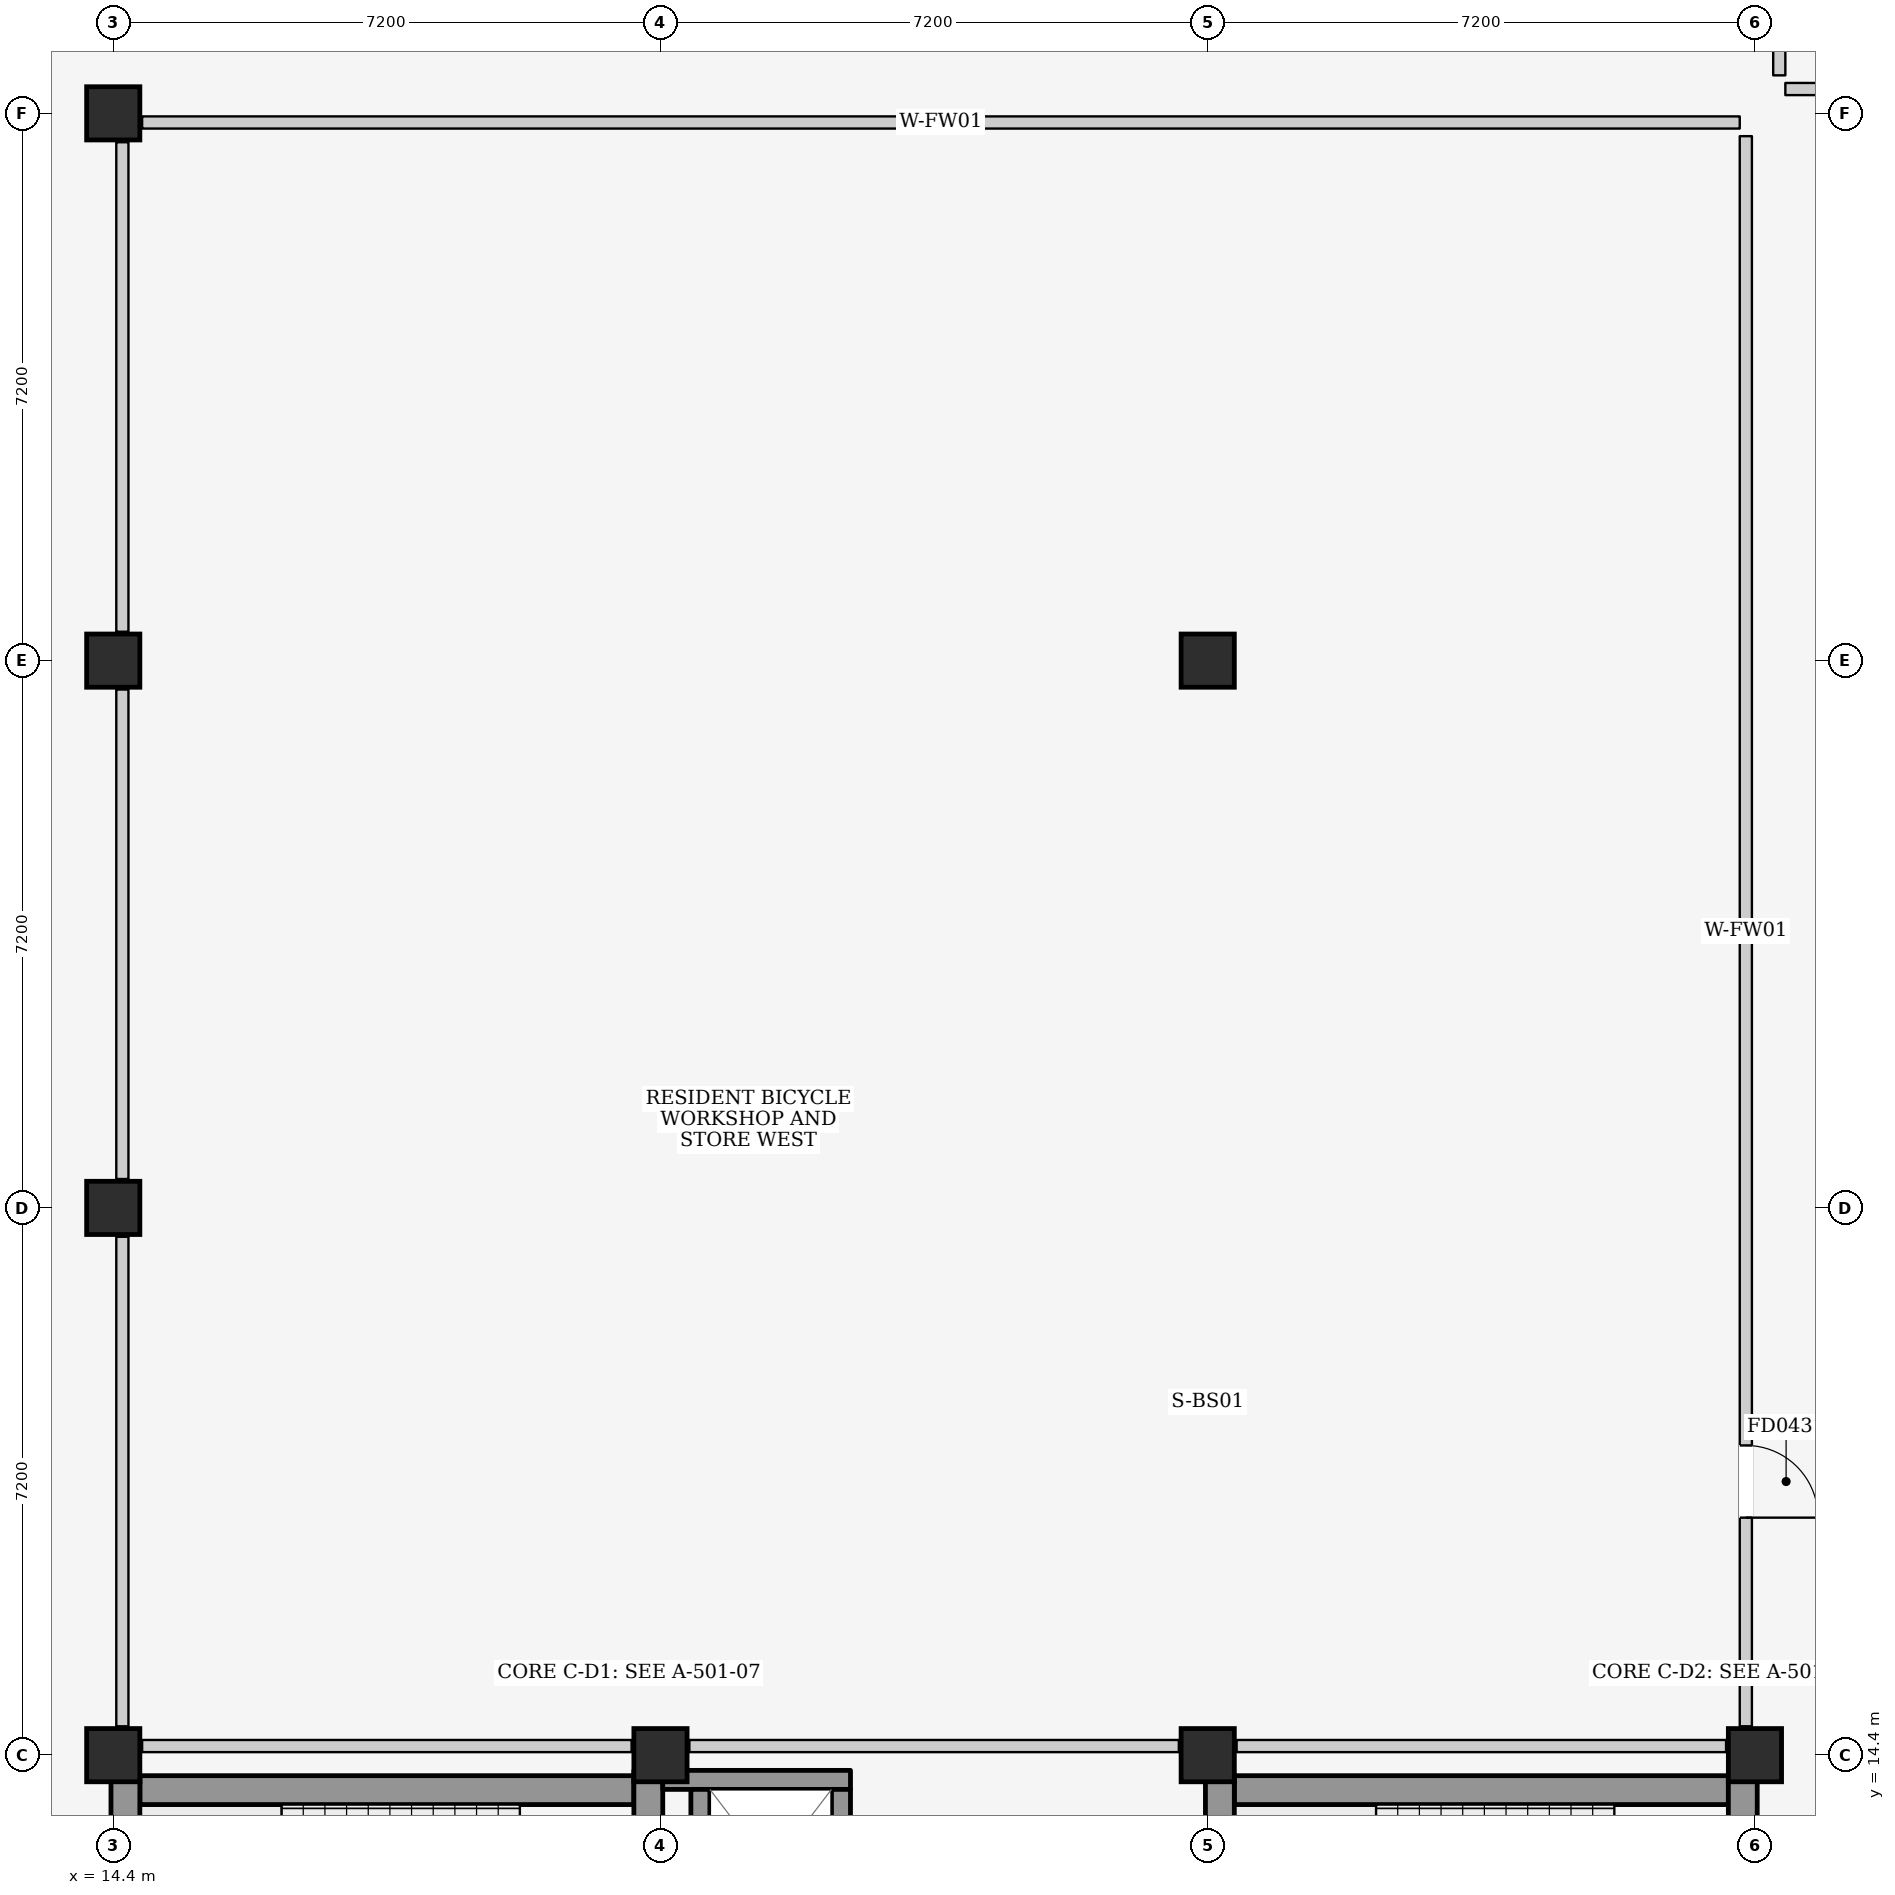
"""IFC4 building model, lengths in metres.
Left out: names, types, materials, properties, quantities, classifications, styles, units other than length and angle.
Written with IfcOpenShell. Run it as: python <this file> out.ifc"""

import sys

from ifc_helpers import new_model, si_unit, direction, frame, frame_2d, origin, origin_2d, place, context, subcontext, project, spatial, rectangle, extrude, element, fill, save


model = new_model("IFC4")
c1 = context("Model", 3, precision=1e-05, world=origin(), true_north=direction((0.0, 1.0)))
c2 = subcontext(c1, "Body", "Model", "MODEL_VIEW")
j1 = project(units=[si_unit("LENGTHUNIT", "METRE"), si_unit("PLANEANGLEUNIT", "RADIAN")], contexts=[c1])
p1 = place(None, origin())
s1 = spatial("IfcSite", under=j1, at=p1, CompositionType="ELEMENT")
p2 = place(p1, origin())
s2 = spatial("IfcBuilding", under=s1, at=p2, CompositionType="ELEMENT")
p3 = place(p2, frame((0.0, 0.0, -4.2)))
s3 = spatial("IfcBuildingStorey", under=s2, at=p3, CompositionType="ELEMENT", Elevation=-4.2)
for number, where, z_axis, x_axis in (
    (1, (14.4, 14.4, 0.0), (0.0, 0.0, 1.0), (1.0, 0.0, 0.0)),
    (2, (14.4, 21.6, 0.0), (0.0, 0.0, 1.0), (1.0, 0.0, 0.0)),
    (3, (14.4, 28.8, 0.0), (0.0, 0.0, 1.0), (1.0, 0.0, 0.0)),
    (4, (14.4, 36.0, 0.0), (0.0, 0.0, 1.0), (1.0, 0.0, 0.0)),
    (5, (21.6, 14.4, 0.0), (0.0, 0.0, 1.0), (1.0, 0.0, 0.0)),
    (6, (28.8, 14.4, 0.0), (0.0, 0.0, 1.0), (1.0, 0.0, 0.0)),
):
    element("IfcColumn", number, at=place(p3, frame(where, z_axis=z_axis, x_axis=x_axis)), inside=s3, PredefinedType="COLUMN", context=c2, shape_type="SweptSolid", body=[
        extrude(rectangle(XDim=0.7, YDim=0.7, at=origin_2d()), origin(), (0.0, 0.0, 1.0), 4.2),
    ])
p4 = place(p3, frame((28.8, 28.8, 0.0), z_axis=(0.0, 0.0, 1.0), x_axis=(1.0, 0.0, 0.0)))
e7 = element("IfcColumn", 7, at=p4, inside=s3, PredefinedType="COLUMN", context=c2, shape_type="SweptSolid", body=[
    extrude(rectangle(XDim=0.7, YDim=0.7, at=origin_2d()), origin(), (0.0, 0.0, 1.0), 3.98),
])
p5 = place(p3, frame((36.0, 14.4, 0.0), z_axis=(0.0, 0.0, 1.0), x_axis=(1.0, 0.0, 0.0)))
e8 = element("IfcColumn", 8, at=p5, inside=s3, PredefinedType="COLUMN", context=c2, shape_type="SweptSolid", body=[
    extrude(rectangle(XDim=0.7, YDim=0.7, at=origin_2d()), origin(), (0.0, 0.0, 1.0), 4.2),
])
p6 = place(p3, frame((14.75, 13.94, 0.0), z_axis=(0.0, 0.0, 1.0), x_axis=(1.0, 0.0, 0.0)))
e9 = element("IfcWall", 9, at=p6, inside=s3, PredefinedType="SHEAR", context=c2, shape_type="SweptSolid", body=[
    extrude(rectangle(XDim=6.5, YDim=0.38, at=frame_2d((3.25, 0.0))), origin(), (0.0, 0.0, 1.0), 3.79),
])
p7 = place(p3, frame((14.56, 10.37, 0.0), z_axis=(0.0, 0.0, 1.0), x_axis=(0.0, 1.0, 0.0)))
e10 = element("IfcWall", 10, at=p7, inside=s3, PredefinedType="SHEAR", context=c2, shape_type="SweptSolid", body=[
    extrude(rectangle(XDim=3.76, YDim=0.38, at=frame_2d((1.88, 0.0))), origin(), (0.0, 0.0, 1.0), 3.79),
])
p8 = place(p3, frame((21.44, 10.37, 0.0), z_axis=(0.0, 0.0, 1.0), x_axis=(0.0, 1.0, 0.0)))
e11 = element("IfcWall", 11, at=p8, inside=s3, PredefinedType="SHEAR", context=c2, shape_type="SweptSolid", body=[
    extrude(rectangle(XDim=3.83, YDim=0.38, at=frame_2d((1.915, 0.0))), origin(), (0.0, 0.0, 1.0), 3.79),
])
p9 = place(p3, frame((21.63, 14.075, 0.0), z_axis=(0.0, 0.0, 1.0), x_axis=(1.0, 0.0, 0.0)))
e12 = element("IfcWall", 12, at=p9, inside=s3, PredefinedType="SHEAR", context=c2, shape_type="SweptSolid", body=[
    extrude(rectangle(XDim=2.47, YDim=0.25, at=frame_2d((1.235, 0.0))), origin(), (0.0, 0.0, 1.0), 3.79),
])
for number, where, z_axis, x_axis in (
    (13, (22.125, 11.85, 0.0), (0.0, 0.0, 1.0), (0.0, 1.0, 0.0)),
    (14, (23.975, 11.85, 0.0), (0.0, 0.0, 1.0), (0.0, 1.0, 0.0)),
):
    element("IfcWall", number, at=place(p3, frame(where, z_axis=z_axis, x_axis=x_axis)), inside=s3, PredefinedType="SHEAR", context=c2, shape_type="SweptSolid", body=[
        extrude(rectangle(XDim=2.1, YDim=0.25, at=frame_2d((1.05, 0.0))), origin(), (0.0, 0.0, 1.0), 3.79),
    ])
p10 = place(p3, frame((29.15, 13.94, 0.0), z_axis=(0.0, 0.0, 1.0), x_axis=(1.0, 0.0, 0.0)))
e15 = element("IfcWall", 15, at=p10, inside=s3, PredefinedType="SHEAR", context=c2, shape_type="SweptSolid", body=[
    extrude(rectangle(XDim=6.5, YDim=0.38, at=frame_2d((3.25, 0.0))), origin(), (0.0, 0.0, 1.0), 3.79),
])
for number, where, z_axis, x_axis in (
    (16, (28.96, 10.37, 0.0), (0.0, 0.0, 1.0), (0.0, 1.0, 0.0)),
    (17, (35.84, 10.37, 0.0), (0.0, 0.0, 1.0), (0.0, 1.0, 0.0)),
):
    element("IfcWall", number, at=place(p3, frame(where, z_axis=z_axis, x_axis=x_axis)), inside=s3, PredefinedType="SHEAR", context=c2, shape_type="SweptSolid", body=[
        extrude(rectangle(XDim=3.76, YDim=0.38, at=frame_2d((1.88, 0.0))), origin(), (0.0, 0.0, 1.0), 3.79),
    ])
p11 = place(p3, frame((14.78, 35.88, 0.0), z_axis=(0.0, 0.0, 1.0), x_axis=(1.0, 0.0, 0.0)))
e18 = element("IfcWall", 18, at=p11, inside=s3, PredefinedType="PARTITIONING", context=c2, shape_type="SweptSolid", body=[
    extrude(rectangle(XDim=21.02, YDim=0.16, at=frame_2d((10.51, 0.0))), origin(), (0.0, 0.0, 1.0), 3.79),
])
for number, where, z_axis, x_axis in (
    (19, (14.78, 14.52, 0.0), (0.0, 0.0, 1.0), (1.0, 0.0, 0.0)),
    (20, (21.98, 14.52, 0.0), (0.0, 0.0, 1.0), (1.0, 0.0, 0.0)),
):
    element("IfcWall", number, at=place(p3, frame(where, z_axis=z_axis, x_axis=x_axis)), inside=s3, PredefinedType="PARTITIONING", context=c2, shape_type="SweptSolid", body=[
        extrude(rectangle(XDim=6.44, YDim=0.16, at=frame_2d((3.22, 0.0))), origin(), (0.0, 0.0, 1.0), 3.025),
    ])
p12 = place(p3, frame((29.18, 14.52, 0.0), z_axis=(0.0, 0.0, 1.0), x_axis=(1.0, 0.0, 0.0)))
e21 = element("IfcWall", 21, at=p12, inside=s3, PredefinedType="PARTITIONING", context=c2, shape_type="SweptSolid", body=[
    extrude(rectangle(XDim=6.44, YDim=0.16, at=frame_2d((3.22, 0.0))), origin(), (0.0, 0.0, 1.0), 3.025),
])
for number, where, z_axis, x_axis in (
    (22, (14.52, 14.78, 0.0), (0.0, 0.0, 1.0), (0.0, 1.0, 0.0)),
    (23, (14.52, 21.98, 0.0), (0.0, 0.0, 1.0), (0.0, 1.0, 0.0)),
):
    element("IfcWall", number, at=place(p3, frame(where, z_axis=z_axis, x_axis=x_axis)), inside=s3, PredefinedType="PARTITIONING", context=c2, shape_type="SweptSolid", body=[
        extrude(rectangle(XDim=6.44, YDim=0.16, at=frame_2d((3.22, 0.0))), origin(), (0.0, 0.0, 1.0), 3.025),
    ])
p13 = place(p3, frame((14.52, 29.18, 0.0), z_axis=(0.0, 0.0, 1.0), x_axis=(0.0, 1.0, 0.0)))
e24 = element("IfcWall", 24, at=p13, inside=s3, PredefinedType="PARTITIONING", context=c2, shape_type="SweptSolid", body=[
    extrude(rectangle(XDim=6.44, YDim=0.16, at=frame_2d((3.22, 0.0))), origin(), (0.0, 0.0, 1.0), 3.025),
])
p14 = place(p3, frame((35.88, 14.78, 0.0), z_axis=(0.0, 0.0, 1.0), x_axis=(0.0, 1.0, 0.0)))
e25 = element("IfcWall", 25, at=p14, inside=s3, PredefinedType="PARTITIONING", context=c2, shape_type="SweptSolid", body=[
    extrude(rectangle(XDim=20.92, YDim=0.16, at=frame_2d((10.46, 0.0))), origin(), (0.0, 0.0, 1.0), 3.79),
])
p15 = place(p14, frame((2.745, 0.0, 0.0)))
e26 = element("IfcOpeningElement", 26, at=p15, cuts=e25, PredefinedType="OPENING", context=c2, shape_type="SweptSolid", body=[
    extrude(rectangle(XDim=0.95, YDim=2.1, at=frame_2d((0.475, 1.05))), frame((0.0, 0.095, 0.0), z_axis=(0.0, -1.0, 0.0), x_axis=(1.0, 0.0, 0.0)), (0.0, 0.0, 1.0), 0.19),
])
p16 = place(p3, frame((36.4, 36.32, 0.0), z_axis=(0.0, 0.0, 1.0), x_axis=(1.0, 0.0, 0.0)))
e27 = element("IfcWall", 27, at=p16, inside=s3, PredefinedType="PARTITIONING", context=c2, shape_type="SweptSolid", body=[
    extrude(rectangle(XDim=3.2, YDim=0.16, at=frame_2d((1.6, 0.0))), origin(), (0.0, 0.0, 1.0), 3.79),
])
p17 = place(p3, frame((36.32, 36.5, 0.0), z_axis=(0.0, 0.0, 1.0), x_axis=(0.0, 1.0, 0.0)))
e28 = element("IfcWall", 28, at=p17, inside=s3, PredefinedType="PARTITIONING", context=c2, shape_type="SweptSolid", body=[
    extrude(rectangle(XDim=4.6, YDim=0.16, at=frame_2d((2.3, 0.0))), origin(), (0.0, 0.0, 1.0), 3.79),
])
p18 = place(p15, frame((0.95, 0.0, 0.0), z_axis=(0.0, 0.0, 1.0), x_axis=(-1.0, 0.0, 0.0)))
e29 = element("IfcDoor", 29, at=p18, inside=s3, OperationType="SINGLE_SWING_RIGHT", PredefinedType="DOOR", context=c2, shape_type="SweptSolid", body=[
    extrude(rectangle(XDim=0.95, YDim=2.1, at=frame_2d((0.475, 1.05))), frame((0.0, 0.025, 0.0), z_axis=(0.0, -1.0, 0.0), x_axis=(1.0, 0.0, 0.0)), (0.0, 0.0, 1.0), 0.05),
])
fill(e26, e29)
save(model, sys.argv[1])
